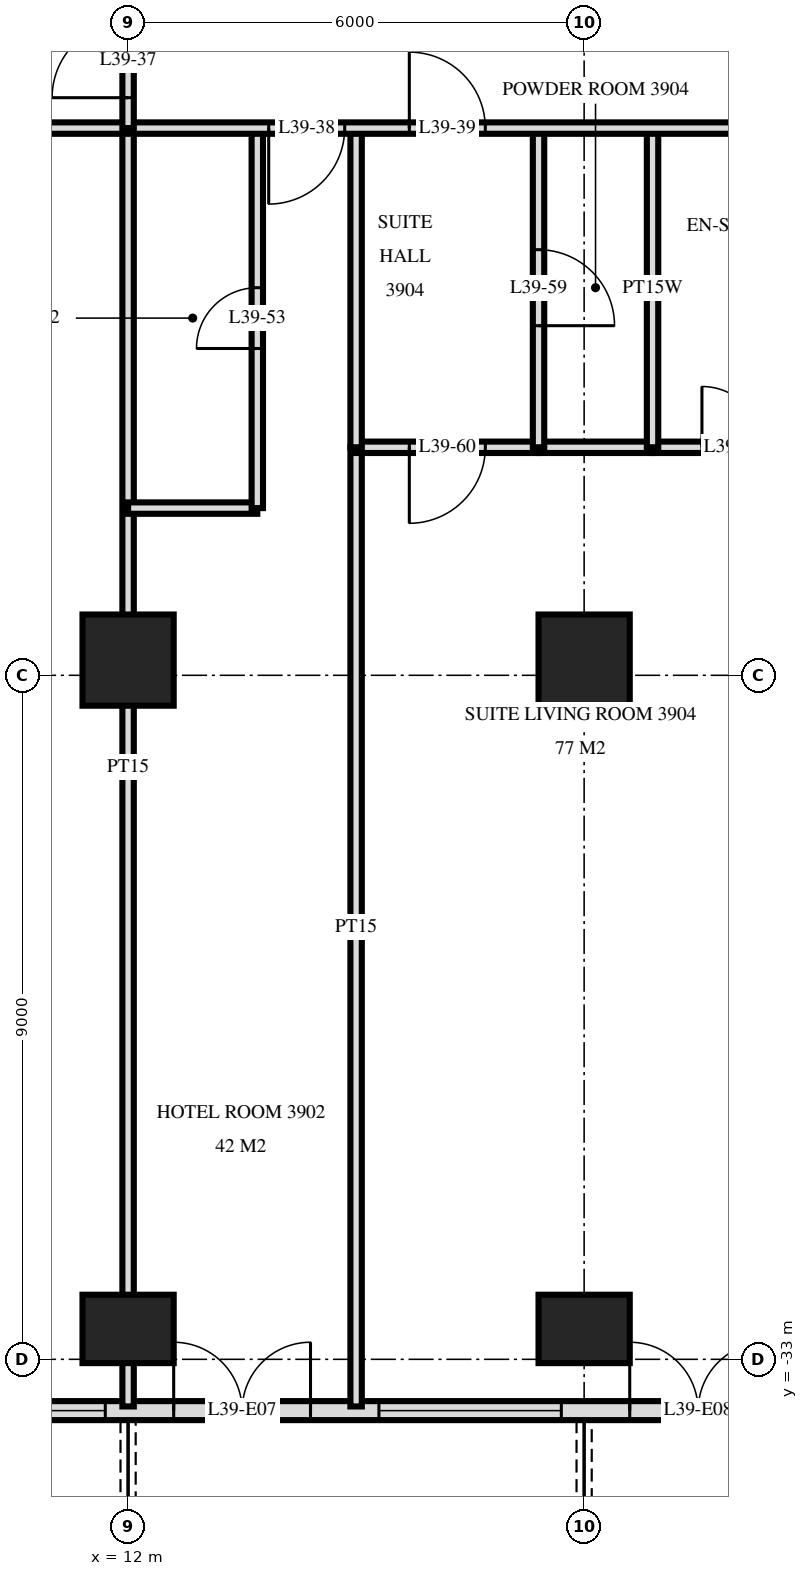
"""IFC4 building model, lengths in metres.
Left out: names, types, materials, properties, quantities, classifications, styles, units other than length and angle.
Written with IfcOpenShell. Run it as: python <this file> out.ifc"""

import sys

from ifc_helpers import new_model, si_unit, direction, frame, frame_2d, origin, origin_2d, place, context, subcontext, project, spatial, rectangle, extrude, element, fill, save


model = new_model("IFC4")
c1 = context("Model", 3, precision=1e-05, world=origin(), true_north=direction((0.0, 1.0)))
c2 = subcontext(c1, "Body", "Model", "MODEL_VIEW")
j1 = project(units=[si_unit("LENGTHUNIT", "METRE"), si_unit("PLANEANGLEUNIT", "RADIAN")], contexts=[c1])
p1 = place(None, origin())
s1 = spatial("IfcSite", under=j1, at=p1, CompositionType="ELEMENT")
p2 = place(p1, origin())
s2 = spatial("IfcBuilding", under=s1, at=p2, CompositionType="ELEMENT")
p3 = place(p2, frame((0.0, 0.0, 152.4)))
s3 = spatial("IfcBuildingStorey", under=s2, at=p3, CompositionType="ELEMENT", Elevation=152.4)
p4 = place(p3, frame((12.0, -32.6, 0.0), z_axis=(0.0, 0.0, 1.0), x_axis=(1.0, 0.0, 0.0)))
e1 = element("IfcColumn", 1, at=p4, inside=s3, PredefinedType="COLUMN", context=c2, shape_type="SweptSolid", body=[
    extrude(rectangle(XDim=1.2, YDim=0.9, at=origin_2d()), origin(), (0.0, 0.0, 1.0), 3.6),
])
p5 = place(p3, frame((12.0, -23.8, 0.0), z_axis=(0.0, 0.0, 1.0), x_axis=(1.0, 0.0, 0.0)))
e2 = element("IfcColumn", 2, at=p5, inside=s3, PredefinedType="COLUMN", context=c2, shape_type="SweptSolid", body=[
    extrude(rectangle(XDim=1.2, YDim=1.2, at=origin_2d()), origin(), (0.0, 0.0, 1.0), 3.6),
])
p6 = place(p3, frame((18.0, -32.6, 0.0), z_axis=(0.0, 0.0, 1.0), x_axis=(1.0, 0.0, 0.0)))
e3 = element("IfcColumn", 3, at=p6, inside=s3, PredefinedType="COLUMN", context=c2, shape_type="SweptSolid", body=[
    extrude(rectangle(XDim=1.2, YDim=0.9, at=origin_2d()), origin(), (0.0, 0.0, 1.0), 3.6),
])
p7 = place(p3, frame((18.0, -23.8, 0.0), z_axis=(0.0, 0.0, 1.0), x_axis=(1.0, 0.0, 0.0)))
e4 = element("IfcColumn", 4, at=p7, inside=s3, PredefinedType="COLUMN", context=c2, shape_type="SweptSolid", body=[
    extrude(rectangle(XDim=1.2, YDim=1.2, at=origin_2d()), origin(), (0.0, 0.0, 1.0), 3.6),
])
p8 = place(p3, frame((-23.675, -33.675, 0.0), z_axis=(0.0, 0.0, 1.0), x_axis=(1.0, 0.0, 0.0)))
e5 = element("IfcWall", 5, at=p8, inside=s3, PredefinedType="SOLIDWALL", context=c2, shape_type="SweptSolid", body=[
    extrude(rectangle(XDim=47.351, YDim=0.25, at=frame_2d((23.675, 0.0))), origin(), (0.0, 0.0, 1.0), 3.32),
])
p9 = place(p8, frame((3.425, 0.0, 0.0)))
e6 = element("IfcOpeningElement", 6, at=p9, cuts=e5, PredefinedType="OPENING", context=c2, shape_type="SweptSolid", body=[
    extrude(rectangle(XDim=1.8, YDim=2.4, at=frame_2d((0.9, 1.2))), frame((0.0, 0.135, 0.0), z_axis=(0.0, -1.0, 0.0), x_axis=(1.0, 0.0, 0.0)), (0.0, 0.0, 1.0), 0.27),
])
p10 = place(p8, frame((6.275, 0.0, 0.0)))
e7 = element("IfcOpeningElement", 7, at=p10, cuts=e5, PredefinedType="OPENING", context=c2, shape_type="SweptSolid", body=[
    extrude(rectangle(XDim=1.8, YDim=2.4, at=frame_2d((0.9, 1.2))), frame((0.0, 0.135, 0.0), z_axis=(0.0, -1.0, 0.0), x_axis=(1.0, 0.0, 0.0)), (0.0, 0.0, 1.0), 0.27),
])
p11 = place(p8, frame((8.975, 0.0, 0.3)))
e8 = element("IfcOpeningElement", 8, at=p11, cuts=e5, PredefinedType="OPENING", context=c2, shape_type="SweptSolid", body=[
    extrude(rectangle(XDim=2.4, YDim=2.1, at=frame_2d((1.2, 1.05))), frame((0.0, 0.135, 0.0), z_axis=(0.0, -1.0, 0.0), x_axis=(1.0, 0.0, 0.0)), (0.0, 0.0, 1.0), 0.27),
])
p12 = place(p8, frame((12.275, 0.0, 0.0)))
e9 = element("IfcOpeningElement", 9, at=p12, cuts=e5, PredefinedType="OPENING", context=c2, shape_type="SweptSolid", body=[
    extrude(rectangle(XDim=1.8, YDim=2.4, at=frame_2d((0.9, 1.2))), frame((0.0, 0.135, 0.0), z_axis=(0.0, -1.0, 0.0), x_axis=(1.0, 0.0, 0.0)), (0.0, 0.0, 1.0), 0.27),
])
p13 = place(p8, frame((14.975, 0.0, 0.3)))
e10 = element("IfcOpeningElement", 10, at=p13, cuts=e5, PredefinedType="OPENING", context=c2, shape_type="SweptSolid", body=[
    extrude(rectangle(XDim=2.4, YDim=2.1, at=frame_2d((1.2, 1.05))), frame((0.0, 0.135, 0.0), z_axis=(0.0, -1.0, 0.0), x_axis=(1.0, 0.0, 0.0)), (0.0, 0.0, 1.0), 0.27),
])
p14 = place(p8, frame((21.275, 0.0, 0.0)))
e11 = element("IfcOpeningElement", 11, at=p14, cuts=e5, PredefinedType="OPENING", context=c2, shape_type="SweptSolid", body=[
    extrude(rectangle(XDim=1.8, YDim=2.4, at=frame_2d((0.9, 1.2))), frame((0.0, 0.135, 0.0), z_axis=(0.0, -1.0, 0.0), x_axis=(1.0, 0.0, 0.0)), (0.0, 0.0, 1.0), 0.27),
])
p15 = place(p8, frame((24.275, 0.0, 0.0)))
e12 = element("IfcOpeningElement", 12, at=p15, cuts=e5, PredefinedType="OPENING", context=c2, shape_type="SweptSolid", body=[
    extrude(rectangle(XDim=1.8, YDim=2.4, at=frame_2d((0.9, 1.2))), frame((0.0, 0.135, 0.0), z_axis=(0.0, -1.0, 0.0), x_axis=(1.0, 0.0, 0.0)), (0.0, 0.0, 1.0), 0.27),
])
p16 = place(p8, frame((30.275, 0.0, 0.0)))
e13 = element("IfcOpeningElement", 13, at=p16, cuts=e5, PredefinedType="OPENING", context=c2, shape_type="SweptSolid", body=[
    extrude(rectangle(XDim=1.8, YDim=2.4, at=frame_2d((0.9, 1.2))), frame((0.0, 0.135, 0.0), z_axis=(0.0, -1.0, 0.0), x_axis=(1.0, 0.0, 0.0)), (0.0, 0.0, 1.0), 0.27),
])
p17 = place(p8, frame((32.975, 0.0, 0.3)))
e14 = element("IfcOpeningElement", 14, at=p17, cuts=e5, PredefinedType="OPENING", context=c2, shape_type="SweptSolid", body=[
    extrude(rectangle(XDim=2.4, YDim=2.1, at=frame_2d((1.2, 1.05))), frame((0.0, 0.135, 0.0), z_axis=(0.0, -1.0, 0.0), x_axis=(1.0, 0.0, 0.0)), (0.0, 0.0, 1.0), 0.27),
])
p18 = place(p8, frame((36.275, 0.0, 0.0)))
e15 = element("IfcOpeningElement", 15, at=p18, cuts=e5, PredefinedType="OPENING", context=c2, shape_type="SweptSolid", body=[
    extrude(rectangle(XDim=1.8, YDim=2.4, at=frame_2d((0.9, 1.2))), frame((0.0, 0.135, 0.0), z_axis=(0.0, -1.0, 0.0), x_axis=(1.0, 0.0, 0.0)), (0.0, 0.0, 1.0), 0.27),
])
p19 = place(p8, frame((38.975, 0.0, 0.3)))
e16 = element("IfcOpeningElement", 16, at=p19, cuts=e5, PredefinedType="OPENING", context=c2, shape_type="SweptSolid", body=[
    extrude(rectangle(XDim=2.4, YDim=2.1, at=frame_2d((1.2, 1.05))), frame((0.0, 0.135, 0.0), z_axis=(0.0, -1.0, 0.0), x_axis=(1.0, 0.0, 0.0)), (0.0, 0.0, 1.0), 0.27),
])
p20 = place(p8, frame((42.275, 0.0, 0.0)))
e17 = element("IfcOpeningElement", 17, at=p20, cuts=e5, PredefinedType="OPENING", context=c2, shape_type="SweptSolid", body=[
    extrude(rectangle(XDim=1.8, YDim=2.4, at=frame_2d((0.9, 1.2))), frame((0.0, 0.135, 0.0), z_axis=(0.0, -1.0, 0.0), x_axis=(1.0, 0.0, 0.0)), (0.0, 0.0, 1.0), 0.27),
])
p21 = place(p8, frame((45.125, 0.0, 0.3)))
e18 = element("IfcOpeningElement", 18, at=p21, cuts=e5, PredefinedType="OPENING", context=c2, shape_type="SweptSolid", body=[
    extrude(rectangle(XDim=1.8, YDim=2.1, at=frame_2d((0.9, 1.05))), frame((0.0, 0.135, 0.0), z_axis=(0.0, -1.0, 0.0), x_axis=(1.0, 0.0, 0.0)), (0.0, 0.0, 1.0), 0.27),
])
p22 = place(p3, frame((18.9, -21.0, 0.0), z_axis=(0.0, 0.0, 1.0), x_axis=(0.0, 1.0, 0.0)))
e19 = element("IfcWall", 19, at=p22, inside=s3, PredefinedType="PLUMBINGWALL", context=c2, shape_type="SweptSolid", body=[
    extrude(rectangle(XDim=4.2, YDim=0.15, at=frame_2d((2.1, 0.0))), origin(), (0.0, 0.0, 1.0), 3.32),
])
p23 = place(p3, frame((17.4, -21.0, 0.0), z_axis=(0.0, 0.0, 1.0), x_axis=(0.0, 1.0, 0.0)))
e20 = element("IfcWall", 20, at=p23, inside=s3, PredefinedType="PARTITIONING", context=c2, shape_type="SweptSolid", body=[
    extrude(rectangle(XDim=4.2, YDim=0.15, at=frame_2d((2.1, 0.0))), origin(), (0.0, 0.0, 1.0), 3.32),
])
p24 = place(p23, frame((1.6, 0.0, 0.0)))
e21 = element("IfcOpeningElement", 21, at=p24, cuts=e20, PredefinedType="OPENING", context=c2, shape_type="SweptSolid", body=[
    extrude(rectangle(XDim=1.0, YDim=2.1, at=frame_2d((0.5, 1.05))), frame((0.0, 0.085, 0.0), z_axis=(0.0, -1.0, 0.0), x_axis=(1.0, 0.0, 0.0)), (0.0, 0.0, 1.0), 0.17),
])
p25 = place(p3, frame((15.0, -21.0, 0.0), z_axis=(0.0, 0.0, 1.0), x_axis=(0.0, 1.0, 0.0)))
e22 = element("IfcWall", 22, at=p25, inside=s3, PredefinedType="PARTITIONING", context=c2, shape_type="SweptSolid", body=[
    extrude(rectangle(XDim=4.2, YDim=0.15, at=frame_2d((2.1, 0.0))), origin(), (0.0, 0.0, 1.0), 3.32),
])
p26 = place(p3, frame((15.0, -33.62, 0.0), z_axis=(0.0, 0.0, 1.0), x_axis=(0.0, 1.0, 0.0)))
e23 = element("IfcWall", 23, at=p26, inside=s3, PredefinedType="PARTITIONING", context=c2, shape_type="SweptSolid", body=[
    extrude(rectangle(XDim=12.62, YDim=0.15, at=frame_2d((6.31, 0.0))), origin(), (0.0, 0.0, 1.0), 3.32),
])
p27 = place(p3, frame((13.7, -21.8, 0.0), z_axis=(0.0, 0.0, 1.0), x_axis=(0.0, 1.0, 0.0)))
e24 = element("IfcWall", 24, at=p27, inside=s3, PredefinedType="PARTITIONING", context=c2, shape_type="SweptSolid", body=[
    extrude(rectangle(XDim=5.0, YDim=0.15, at=frame_2d((2.5, 0.0))), origin(), (0.0, 0.0, 1.0), 3.32),
])
p28 = place(p27, frame((2.1, 0.0, 0.0)))
e25 = element("IfcOpeningElement", 25, at=p28, cuts=e24, PredefinedType="OPENING", context=c2, shape_type="SweptSolid", body=[
    extrude(rectangle(XDim=0.8, YDim=2.1, at=frame_2d((0.4, 1.05))), frame((0.0, 0.085, 0.0), z_axis=(0.0, -1.0, 0.0), x_axis=(1.0, 0.0, 0.0)), (0.0, 0.0, 1.0), 0.17),
])
p29 = place(p3, frame((12.0, -16.8, 0.0), z_axis=(0.0, 0.0, 1.0), x_axis=(0.0, 1.0, 0.0)))
e26 = element("IfcWall", 26, at=p29, inside=s3, PredefinedType="PARTITIONING", context=c2, shape_type="SweptSolid", body=[
    extrude(rectangle(XDim=1.75, YDim=0.15, at=frame_2d((0.875, 0.0))), origin(), (0.0, 0.0, 1.0), 3.32),
])
p30 = place(p29, frame((0.4, 0.0, 0.0)))
e27 = element("IfcOpeningElement", 27, at=p30, cuts=e26, PredefinedType="OPENING", context=c2, shape_type="SweptSolid", body=[
    extrude(rectangle(XDim=1.0, YDim=2.1, at=frame_2d((0.5, 1.05))), frame((0.0, 0.085, 0.0), z_axis=(0.0, -1.0, 0.0), x_axis=(1.0, 0.0, 0.0)), (0.0, 0.0, 1.0), 0.17),
])
p31 = place(p3, frame((12.0, -33.62, 0.0), z_axis=(0.0, 0.0, 1.0), x_axis=(0.0, 1.0, 0.0)))
e28 = element("IfcWall", 28, at=p31, inside=s3, PredefinedType="PARTITIONING", context=c2, shape_type="SweptSolid", body=[
    extrude(rectangle(XDim=16.82, YDim=0.15, at=frame_2d((8.41, 0.0))), origin(), (0.0, 0.0, 1.0), 3.32),
])
p32 = place(p3, frame((12.0, -21.8, 0.0), z_axis=(0.0, 0.0, 1.0), x_axis=(1.0, 0.0, 0.0)))
e29 = element("IfcWall", 29, at=p32, inside=s3, PredefinedType="PARTITIONING", context=c2, shape_type="SweptSolid", body=[
    extrude(rectangle(XDim=1.7, YDim=0.15, at=frame_2d((0.85, 0.0))), origin(), (0.0, 0.0, 1.0), 3.32),
])
p33 = place(p3, frame((15.0, -21.0, 0.0), z_axis=(0.0, 0.0, 1.0), x_axis=(1.0, 0.0, 0.0)))
e30 = element("IfcWall", 30, at=p33, inside=s3, PredefinedType="PARTITIONING", context=c2, shape_type="SweptSolid", body=[
    extrude(rectangle(XDim=2.4, YDim=0.15, at=frame_2d((1.2, 0.0))), origin(), (0.0, 0.0, 1.0), 3.32),
])
p34 = place(p33, frame((0.7, 0.0, 0.0)))
e31 = element("IfcOpeningElement", 31, at=p34, cuts=e30, PredefinedType="OPENING", context=c2, shape_type="SweptSolid", body=[
    extrude(rectangle(XDim=1.0, YDim=2.1, at=frame_2d((0.5, 1.05))), frame((0.0, 0.085, 0.0), z_axis=(0.0, -1.0, 0.0), x_axis=(1.0, 0.0, 0.0)), (0.0, 0.0, 1.0), 0.17),
])
p35 = place(p3, frame((18.9, -21.0, 0.0), z_axis=(0.0, 0.0, 1.0), x_axis=(1.0, 0.0, 0.0)))
e32 = element("IfcWall", 32, at=p35, inside=s3, PredefinedType="PARTITIONING", context=c2, shape_type="SweptSolid", body=[
    extrude(rectangle(XDim=9.12, YDim=0.15, at=frame_2d((4.56, 0.0))), origin(), (0.0, 0.0, 1.0), 3.32),
])
p36 = place(p35, frame((0.65, 0.0, 0.0)))
e33 = element("IfcOpeningElement", 33, at=p36, cuts=e32, PredefinedType="OPENING", context=c2, shape_type="SweptSolid", body=[
    extrude(rectangle(XDim=0.8, YDim=2.1, at=frame_2d((0.4, 1.05))), frame((0.0, 0.085, 0.0), z_axis=(0.0, -1.0, 0.0), x_axis=(1.0, 0.0, 0.0)), (0.0, 0.0, 1.0), 0.17),
])
p37 = place(p35, frame((5.7, 0.0, 0.0)))
e34 = element("IfcOpeningElement", 34, at=p37, cuts=e32, PredefinedType="OPENING", context=c2, shape_type="SweptSolid", body=[
    extrude(rectangle(XDim=0.9, YDim=2.1, at=frame_2d((0.45, 1.05))), frame((0.0, 0.085, 0.0), z_axis=(0.0, -1.0, 0.0), x_axis=(1.0, 0.0, 0.0)), (0.0, 0.0, 1.0), 0.17),
])
p38 = place(p3, frame((17.4, -21.0, 0.0), z_axis=(0.0, 0.0, 1.0), x_axis=(1.0, 0.0, 0.0)))
e35 = element("IfcWall", 35, at=p38, inside=s3, PredefinedType="PLUMBINGWALL", context=c2, shape_type="SweptSolid", body=[
    extrude(rectangle(XDim=1.5, YDim=0.15, at=frame_2d((0.75, 0.0))), origin(), (0.0, 0.0, 1.0), 3.32),
])
p39 = place(p3, frame((-28.02, -16.8, 0.0), z_axis=(0.0, 0.0, 1.0), x_axis=(1.0, 0.0, 0.0)))
e36 = element("IfcWall", 36, at=p39, inside=s3, PredefinedType="PARTITIONING", context=c2, shape_type="SweptSolid", body=[
    extrude(rectangle(XDim=56.04, YDim=0.15, at=frame_2d((28.02, 0.0))), origin(), (0.0, 0.0, 1.0), 3.32),
])
p40 = place(p39, frame((13.17, 0.0, 0.0)))
e37 = element("IfcOpeningElement", 37, at=p40, cuts=e36, PredefinedType="OPENING", context=c2, shape_type="SweptSolid", body=[
    extrude(rectangle(XDim=1.0, YDim=2.1, at=frame_2d((0.5, 1.05))), frame((0.0, 0.085, 0.0), z_axis=(0.0, -1.0, 0.0), x_axis=(1.0, 0.0, 0.0)), (0.0, 0.0, 1.0), 0.17),
])
p41 = place(p39, frame((11.32, 0.0, 0.0)))
e38 = element("IfcOpeningElement", 38, at=p41, cuts=e36, PredefinedType="OPENING", context=c2, shape_type="SweptSolid", body=[
    extrude(rectangle(XDim=1.0, YDim=2.1, at=frame_2d((0.5, 1.05))), frame((0.0, 0.085, 0.0), z_axis=(0.0, -1.0, 0.0), x_axis=(1.0, 0.0, 0.0)), (0.0, 0.0, 1.0), 0.17),
])
p42 = place(p39, frame((41.87, 0.0, 0.0)))
e39 = element("IfcOpeningElement", 39, at=p42, cuts=e36, PredefinedType="OPENING", context=c2, shape_type="SweptSolid", body=[
    extrude(rectangle(XDim=1.0, YDim=2.1, at=frame_2d((0.5, 1.05))), frame((0.0, 0.085, 0.0), z_axis=(0.0, -1.0, 0.0), x_axis=(1.0, 0.0, 0.0)), (0.0, 0.0, 1.0), 0.17),
])
p43 = place(p39, frame((43.72, 0.0, 0.0)))
e40 = element("IfcOpeningElement", 40, at=p43, cuts=e36, PredefinedType="OPENING", context=c2, shape_type="SweptSolid", body=[
    extrude(rectangle(XDim=1.0, YDim=2.1, at=frame_2d((0.5, 1.05))), frame((0.0, 0.085, 0.0), z_axis=(0.0, -1.0, 0.0), x_axis=(1.0, 0.0, 0.0)), (0.0, 0.0, 1.0), 0.17),
])
p44 = place(p39, frame((19.52, 0.0, 0.0)))
e41 = element("IfcOpeningElement", 41, at=p44, cuts=e36, PredefinedType="OPENING", context=c2, shape_type="SweptSolid", body=[
    extrude(rectangle(XDim=1.0, YDim=2.1, at=frame_2d((0.5, 1.05))), frame((0.0, 0.085, 0.0), z_axis=(0.0, -1.0, 0.0), x_axis=(1.0, 0.0, 0.0)), (0.0, 0.0, 1.0), 0.17),
])
p45 = place(p39, frame((27.52, 0.0, 0.0)))
e42 = element("IfcOpeningElement", 42, at=p45, cuts=e36, PredefinedType="OPENING", context=c2, shape_type="SweptSolid", body=[
    extrude(rectangle(XDim=1.0, YDim=2.1, at=frame_2d((0.5, 1.05))), frame((0.0, 0.085, 0.0), z_axis=(0.0, -1.0, 0.0), x_axis=(1.0, 0.0, 0.0)), (0.0, 0.0, 1.0), 0.17),
])
p46 = place(p39, frame((35.52, 0.0, 0.0)))
e43 = element("IfcOpeningElement", 43, at=p46, cuts=e36, PredefinedType="OPENING", context=c2, shape_type="SweptSolid", body=[
    extrude(rectangle(XDim=1.0, YDim=2.1, at=frame_2d((0.5, 1.05))), frame((0.0, 0.085, 0.0), z_axis=(0.0, -1.0, 0.0), x_axis=(1.0, 0.0, 0.0)), (0.0, 0.0, 1.0), 0.17),
])
p47 = place(p17, origin())
e44 = element("IfcWindow", 44, at=p47, inside=s3, PartitioningType="SINGLE_PANEL", PredefinedType="WINDOW", context=c2, shape_type="SweptSolid", body=[
    extrude(rectangle(XDim=2.4, YDim=2.1, at=frame_2d((1.2, 1.05))), frame((0.0, 0.03, 0.0), z_axis=(0.0, -1.0, 0.0), x_axis=(1.0, 0.0, 0.0)), (0.0, 0.0, 1.0), 0.06),
])
fill(e14, e44)
p48 = place(p18, origin())
e45 = element("IfcDoor", 45, at=p48, inside=s3, OperationType="DOUBLE_DOOR_SINGLE_SWING", PredefinedType="DOOR", context=c2, shape_type="SweptSolid", body=[
    extrude(rectangle(XDim=1.8, YDim=2.4, at=frame_2d((0.9, 1.2))), frame((0.0, 0.025, 0.0), z_axis=(0.0, -1.0, 0.0), x_axis=(1.0, 0.0, 0.0)), (0.0, 0.0, 1.0), 0.05),
])
fill(e15, e45)
p49 = place(p19, origin())
e46 = element("IfcWindow", 46, at=p49, inside=s3, PartitioningType="SINGLE_PANEL", PredefinedType="WINDOW", context=c2, shape_type="SweptSolid", body=[
    extrude(rectangle(XDim=2.4, YDim=2.1, at=frame_2d((1.2, 1.05))), frame((0.0, 0.03, 0.0), z_axis=(0.0, -1.0, 0.0), x_axis=(1.0, 0.0, 0.0)), (0.0, 0.0, 1.0), 0.06),
])
fill(e16, e46)
p50 = place(p20, origin())
e47 = element("IfcDoor", 47, at=p50, inside=s3, OperationType="DOUBLE_DOOR_SINGLE_SWING", PredefinedType="DOOR", context=c2, shape_type="SweptSolid", body=[
    extrude(rectangle(XDim=1.8, YDim=2.4, at=frame_2d((0.9, 1.2))), frame((0.0, 0.025, 0.0), z_axis=(0.0, -1.0, 0.0), x_axis=(1.0, 0.0, 0.0)), (0.0, 0.0, 1.0), 0.05),
])
fill(e17, e47)
p51 = place(p30, origin())
e48 = element("IfcDoor", 48, at=p51, inside=s3, OperationType="SINGLE_SWING_RIGHT", PredefinedType="DOOR", context=c2, shape_type="SweptSolid", body=[
    extrude(rectangle(XDim=1.0, YDim=2.1, at=frame_2d((0.5, 1.05))), frame((0.0, 0.025, 0.0), z_axis=(0.0, -1.0, 0.0), x_axis=(1.0, 0.0, 0.0)), (0.0, 0.0, 1.0), 0.05),
])
fill(e27, e48)
p52 = place(p42, frame((0.5, 0.0, 0.0), z_axis=(0.0, 0.0, 1.0), x_axis=(-1.0, 0.0, 0.0)))
e49 = element("IfcDoor", 49, at=p52, inside=s3, OperationType="SINGLE_SWING_LEFT", PredefinedType="DOOR", context=c2, shape_type="SweptSolid", body=[
    extrude(rectangle(XDim=1.0, YDim=2.1, at=frame_2d((0.0, 1.05))), frame((0.0, -0.025, 0.0), z_axis=(0.0, 1.0, 0.0), x_axis=(-1.0, 0.0, 0.0)), (0.0, 0.0, 1.0), 0.05),
])
fill(e39, e49)
p53 = place(p43, origin())
e50 = element("IfcDoor", 50, at=p53, inside=s3, OperationType="SINGLE_SWING_RIGHT", PredefinedType="DOOR", context=c2, shape_type="SweptSolid", body=[
    extrude(rectangle(XDim=1.0, YDim=2.1, at=frame_2d((0.5, 1.05))), frame((0.0, 0.025, 0.0), z_axis=(0.0, -1.0, 0.0), x_axis=(1.0, 0.0, 0.0)), (0.0, 0.0, 1.0), 0.05),
])
fill(e40, e50)
p54 = place(p28, origin())
e51 = element("IfcDoor", 51, at=p54, inside=s3, OperationType="SINGLE_SWING_RIGHT", PredefinedType="DOOR", context=c2, shape_type="SweptSolid", body=[
    extrude(rectangle(XDim=0.8, YDim=2.1, at=frame_2d((0.4, 1.05))), frame((0.0, 0.025, 0.0), z_axis=(0.0, -1.0, 0.0), x_axis=(1.0, 0.0, 0.0)), (0.0, 0.0, 1.0), 0.05),
])
fill(e25, e51)
p55 = place(p24, frame((0.5, 0.0, 0.0), z_axis=(0.0, 0.0, 1.0), x_axis=(-1.0, 0.0, 0.0)))
e52 = element("IfcDoor", 52, at=p55, inside=s3, OperationType="SINGLE_SWING_LEFT", PredefinedType="DOOR", context=c2, shape_type="SweptSolid", body=[
    extrude(rectangle(XDim=1.0, YDim=2.1, at=frame_2d((0.0, 1.05))), frame((0.0, -0.025, 0.0), z_axis=(0.0, 1.0, 0.0), x_axis=(-1.0, 0.0, 0.0)), (0.0, 0.0, 1.0), 0.05),
])
fill(e21, e52)
p56 = place(p34, frame((0.5, 0.0, 0.0), z_axis=(0.0, 0.0, 1.0), x_axis=(-1.0, 0.0, 0.0)))
e53 = element("IfcDoor", 53, at=p56, inside=s3, OperationType="SINGLE_SWING_LEFT", PredefinedType="DOOR", context=c2, shape_type="SweptSolid", body=[
    extrude(rectangle(XDim=1.0, YDim=2.1, at=frame_2d((0.0, 1.05))), frame((0.0, -0.025, 0.0), z_axis=(0.0, 1.0, 0.0), x_axis=(-1.0, 0.0, 0.0)), (0.0, 0.0, 1.0), 0.05),
])
fill(e31, e53)
p57 = place(p36, origin())
e54 = element("IfcDoor", 54, at=p57, inside=s3, OperationType="SINGLE_SWING_RIGHT", PredefinedType="DOOR", context=c2, shape_type="SweptSolid", body=[
    extrude(rectangle(XDim=0.8, YDim=2.1, at=frame_2d((0.4, 1.05))), frame((0.0, 0.025, 0.0), z_axis=(0.0, -1.0, 0.0), x_axis=(1.0, 0.0, 0.0)), (0.0, 0.0, 1.0), 0.05),
])
fill(e33, e54)
save(model, sys.argv[1])
